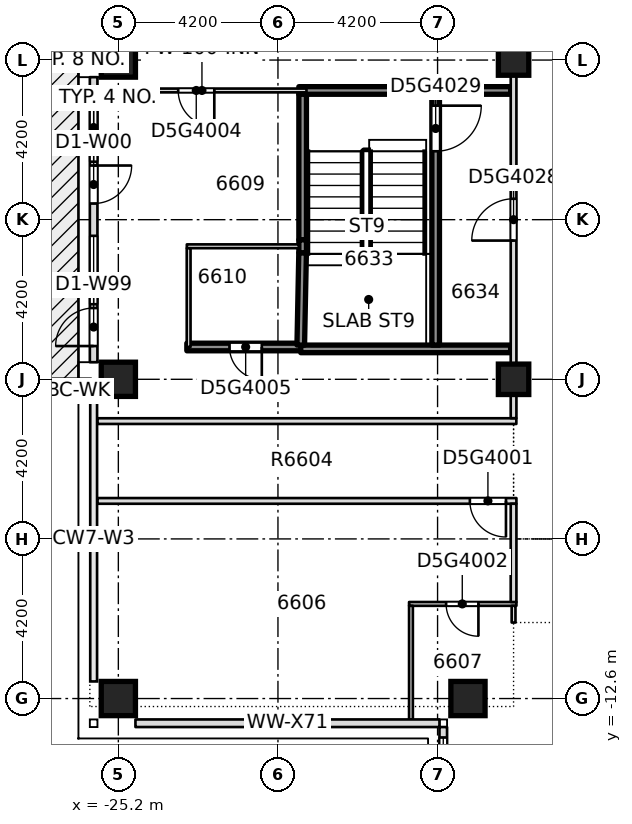
"""IFC4 building model, lengths in metres.
Left out: names, types, materials, properties, quantities, classifications, styles, units other than length and angle.
Written with IfcOpenShell. Run it as: python <this file> out.ifc"""

import sys

from ifc_helpers import new_model, si_unit, direction, frame, frame_2d, origin, origin_2d, place, context, subcontext, project, spatial, rectangle, extrude, element, fill, save


model = new_model("IFC4")
c1 = context("Model", 3, precision=1e-05, world=origin(), true_north=direction((0.0, 1.0)))
c2 = subcontext(c1, "Body", "Model", "MODEL_VIEW")
j1 = project(units=[si_unit("LENGTHUNIT", "METRE"), si_unit("PLANEANGLEUNIT", "RADIAN")], contexts=[c1])
p1 = place(None, origin())
s1 = spatial("IfcSite", under=j1, at=p1, CompositionType="ELEMENT")
p2 = place(p1, origin())
s2 = spatial("IfcBuilding", under=s1, at=p2, CompositionType="ELEMENT")
p3 = place(p2, frame((0.0, 0.0, 251.05)))
s3 = spatial("IfcBuildingStorey", under=s2, at=p3, CompositionType="ELEMENT", Elevation=251.05)
for number, where, z_axis, x_axis in (
    (1, (-25.2, -12.6, -0.4), (0.0, 0.0, 1.0), (1.0, 0.0, 0.0)),
    (2, (-16.0, -12.6, -0.4), (0.0, 0.0, 1.0), (1.0, 0.0, 0.0)),
    (3, (-25.2, -4.2, -0.4), (0.0, 0.0, 1.0), (1.0, 0.0, 0.0)),
    (4, (-25.2, 4.2, -0.4), (0.0, 0.0, 1.0), (1.0, 0.0, 0.0)),
):
    element("IfcColumn", number, at=place(p3, frame(where, z_axis=z_axis, x_axis=x_axis)), inside=s3, PredefinedType="COLUMN", context=c2, shape_type="SweptSolid", body=[
        extrude(rectangle(XDim=0.9, YDim=0.9, at=origin_2d()), origin(), (0.0, 0.0, 1.0), 3.45),
    ])
for number, where, z_axis, x_axis in (
    (5, (-14.8, -4.2, -0.4), (0.0, 0.0, 1.0), (1.0, 0.0, 0.0)),
    (6, (-14.8, 4.2, -0.4), (0.0, 0.0, 1.0), (1.0, 0.0, 0.0)),
):
    element("IfcColumn", number, at=place(p3, frame(where, z_axis=z_axis, x_axis=x_axis)), inside=s3, PredefinedType="COLUMN", context=c2, shape_type="SweptSolid", body=[
        extrude(rectangle(XDim=0.8, YDim=0.8, at=origin_2d()), origin(), (0.0, 0.0, 1.0), 3.45),
    ])
p4 = place(p3, frame((-17.55, -10.11, 0.0), z_axis=(0.0, 0.0, 1.0), x_axis=(1.0, 0.0, 0.0)))
e7 = element("IfcWall", 7, at=p4, inside=s3, PredefinedType="PARTITIONING", context=c2, shape_type="SweptSolid", body=[
    extrude(rectangle(XDim=2.825, YDim=0.1, at=frame_2d((1.413, 0.0))), origin(), (0.0, 0.0, 1.0), 3.05),
])
p5 = place(p4, frame((0.975, 0.0, 0.0)))
e8 = element("IfcOpeningElement", 8, at=p5, cuts=e7, PredefinedType="OPENING", context=c2, shape_type="SweptSolid", body=[
    extrude(rectangle(XDim=0.85, YDim=2.1, at=frame_2d((0.425, 1.05))), frame((0.0, 0.06, 0.0), z_axis=(0.0, -1.0, 0.0), x_axis=(1.0, 0.0, 0.0)), (0.0, 0.0, 1.0), 0.12),
])
p6 = place(p3, frame((-25.75, -7.4, 0.0), z_axis=(0.0, 0.0, 1.0), x_axis=(1.0, 0.0, 0.0)))
e9 = element("IfcWall", 9, at=p6, inside=s3, PredefinedType="PARTITIONING", context=c2, shape_type="SweptSolid", body=[
    extrude(rectangle(XDim=11.025, YDim=0.15, at=frame_2d((5.512, 0.0))), origin(), (0.0, 0.0, 1.0), 3.05),
])
p7 = place(p6, frame((9.8, 0.0, 0.0)))
e10 = element("IfcOpeningElement", 10, at=p7, cuts=e9, PredefinedType="OPENING", context=c2, shape_type="SweptSolid", body=[
    extrude(rectangle(XDim=0.95, YDim=2.1, at=frame_2d((0.475, 1.05))), frame((0.0, 0.085, 0.0), z_axis=(0.0, -1.0, 0.0), x_axis=(1.0, 0.0, 0.0)), (0.0, 0.0, 1.0), 0.17),
])
p8 = place(p3, frame((-25.75, -5.3, 0.0), z_axis=(0.0, 0.0, 1.0), x_axis=(1.0, 0.0, 0.0)))
e11 = element("IfcWall", 11, at=p8, inside=s3, PredefinedType="PARTITIONING", context=c2, shape_type="SweptSolid", body=[
    extrude(rectangle(XDim=11.023, YDim=0.15, at=frame_2d((5.511, 0.0))), origin(), (0.0, 0.0, 1.0), 3.05),
])
p9 = place(p3, frame((-23.398, -3.35, 0.0), z_axis=(0.0, 0.0, 1.0), x_axis=(1.0, 0.0, 0.0)))
e12 = element("IfcWall", 12, at=p9, inside=s3, PredefinedType="SOLIDWALL", context=c2, shape_type="SweptSolid", body=[
    extrude(rectangle(XDim=3.098, YDim=0.2, at=frame_2d((1.549, 0.0))), origin(), (0.0, 0.0, 1.0), 3.05),
])
p10 = place(p9, frame((1.123, 0.0, 0.0)))
e13 = element("IfcOpeningElement", 13, at=p10, cuts=e12, PredefinedType="OPENING", context=c2, shape_type="SweptSolid", body=[
    extrude(rectangle(XDim=0.85, YDim=2.1, at=frame_2d((0.425, 1.05))), frame((0.0, 0.11, 0.0), z_axis=(0.0, -1.0, 0.0), x_axis=(1.0, 0.0, 0.0)), (0.0, 0.0, 1.0), 0.22),
])
p11 = place(p3, frame((-20.4, -3.4, 0.0), z_axis=(0.0, 0.0, 1.0), x_axis=(1.0, 0.0, 0.0)))
e14 = element("IfcWall", 14, at=p11, inside=s3, PredefinedType="SOLIDWALL", context=c2, shape_type="SweptSolid", body=[
    extrude(rectangle(XDim=5.523, YDim=0.2, at=frame_2d((2.761, 0.0))), origin(), (0.0, 0.0, 1.0), 3.05),
])
p12 = place(p3, frame((-23.398, -0.7, 0.0), z_axis=(0.0, 0.0, 1.0), x_axis=(1.0, 0.0, 0.0)))
e15 = element("IfcWall", 15, at=p12, inside=s3, PredefinedType="PARTITIONING", context=c2, shape_type="SweptSolid", body=[
    extrude(rectangle(XDim=2.948, YDim=0.1, at=frame_2d((1.474, 0.0))), origin(), (0.0, 0.0, 1.0), 3.05),
])
p13 = place(p3, frame((-25.75, 3.4, 0.0), z_axis=(0.0, 0.0, 1.0), x_axis=(1.0, 0.0, 0.0)))
e16 = element("IfcWall", 16, at=p13, inside=s3, PredefinedType="PARTITIONING", context=c2, shape_type="SweptSolid", body=[
    extrude(rectangle(XDim=5.5, YDim=0.1, at=frame_2d((2.75, 0.0))), origin(), (0.0, 0.0, 1.0), 3.05),
])
p14 = place(p13, frame((2.125, 0.0, 0.0)))
e17 = element("IfcOpeningElement", 17, at=p14, cuts=e16, PredefinedType="OPENING", context=c2, shape_type="SweptSolid", body=[
    extrude(rectangle(XDim=0.95, YDim=2.1, at=frame_2d((0.475, 1.05))), frame((0.0, 0.06, 0.0), z_axis=(0.0, -1.0, 0.0), x_axis=(1.0, 0.0, 0.0)), (0.0, 0.0, 1.0), 0.12),
])
p15 = place(p3, frame((-20.45, 3.4, 0.0), z_axis=(0.0, 0.0, 1.0), x_axis=(1.0, 0.0, 0.0)))
e18 = element("IfcWall", 18, at=p15, inside=s3, PredefinedType="SOLIDWALL", context=c2, shape_type="SweptSolid", body=[
    extrude(rectangle(XDim=5.575, YDim=0.2, at=frame_2d((2.788, 0.0))), origin(), (0.0, 0.0, 1.0), 3.05),
])
p16 = place(p3, frame((-23.35, -3.348, 0.0), z_axis=(0.0, 0.0, 1.0), x_axis=(0.0, 1.0, 0.0)))
e19 = element("IfcWall", 19, at=p16, inside=s3, PredefinedType="PARTITIONING", context=c2, shape_type="SweptSolid", body=[
    extrude(rectangle(XDim=2.596, YDim=0.1, at=frame_2d((1.298, 0.0))), origin(), (0.0, 0.0, 1.0), 3.05),
])
p17 = place(p3, frame((-20.4, -3.3, 0.0), z_axis=(0.0, 0.0, 1.0), x_axis=(0.019989976481, 0.999800180456, 0.0)))
e20 = element("IfcWall", 20, at=p17, inside=s3, PredefinedType="SOLIDWALL", context=c2, shape_type="SweptSolid", body=[
    extrude(rectangle(XDim=2.43, YDim=0.2, at=frame_2d((1.215, 0.0))), origin(), (0.0, 0.0, 1.0), 3.05),
])
p18 = place(p3, frame((-20.35, -0.53, 0.0), z_axis=(0.0, 0.0, 1.0), x_axis=(0.0, 1.0, 0.0)))
e21 = element("IfcWall", 21, at=p18, inside=s3, PredefinedType="SOLIDWALL", context=c2, shape_type="SweptSolid", body=[
    extrude(rectangle(XDim=3.83, YDim=0.2, at=frame_2d((1.915, 0.0))), origin(), (0.0, 0.0, 1.0), 3.05),
])
p19 = place(p3, frame((-17.5, -13.15, 0.0), z_axis=(0.0, 0.0, 1.0), x_axis=(0.0, 1.0, 0.0)))
e22 = element("IfcWall", 22, at=p19, inside=s3, PredefinedType="PARTITIONING", context=c2, shape_type="SweptSolid", body=[
    extrude(rectangle(XDim=2.99, YDim=0.1, at=frame_2d((1.495, 0.0))), origin(), (0.0, 0.0, 1.0), 3.05),
])
p20 = place(p3, frame((-16.85, -3.3, 0.0), z_axis=(0.0, 0.0, 1.0), x_axis=(0.0, 1.0, 0.0)))
e23 = element("IfcWall", 23, at=p20, inside=s3, PredefinedType="SOLIDWALL", context=c2, shape_type="SweptSolid", body=[
    extrude(rectangle(XDim=6.6, YDim=0.2, at=frame_2d((3.3, 0.0))), origin(), (0.0, 0.0, 1.0), 3.05),
])
p21 = place(p20, frame((5.1, 0.0, 0.0)))
e24 = element("IfcOpeningElement", 24, at=p21, cuts=e23, PredefinedType="OPENING", context=c2, shape_type="SweptSolid", body=[
    extrude(rectangle(XDim=1.2, YDim=2.1, at=frame_2d((0.6, 1.05))), frame((0.0, 0.11, 0.0), z_axis=(0.0, -1.0, 0.0), x_axis=(1.0, 0.0, 0.0)), (0.0, 0.0, 1.0), 0.22),
])
p22 = place(p3, frame((-14.8, -10.6, 0.0), z_axis=(0.0, 0.0, 1.0), x_axis=(0.0, 1.0, 0.0)))
e25 = element("IfcWall", 25, at=p22, inside=s3, PredefinedType="PARTITIONING", context=c2, shape_type="SweptSolid", body=[
    extrude(rectangle(XDim=0.44, YDim=0.1, at=frame_2d((0.22, 0.0))), origin(), (0.0, 0.0, 1.0), 3.05),
])
p23 = place(p3, frame((-14.8, -10.06, 0.0), z_axis=(0.0, 0.0, 1.0), x_axis=(0.0, 1.0, 0.0)))
e26 = element("IfcWall", 26, at=p23, inside=s3, PredefinedType="PARTITIONING", context=c2, shape_type="SweptSolid", body=[
    extrude(rectangle(XDim=2.585, YDim=0.15, at=frame_2d((1.292, 0.0))), origin(), (0.0, 0.0, 1.0), 3.05),
])
p24 = place(p3, frame((-14.8, -5.223, 0.0), z_axis=(0.0, 0.0, 1.0), x_axis=(0.0, 1.0, 0.0)))
e27 = element("IfcWall", 27, at=p24, inside=s3, PredefinedType="PARTITIONING", context=c2, shape_type="SweptSolid", body=[
    extrude(rectangle(XDim=18.523, YDim=0.15, at=frame_2d((9.261, 0.0))), origin(), (0.0, 0.0, 1.0), 3.05),
])
p25 = place(p24, frame((13.098, 0.0, 0.0)))
e28 = element("IfcOpeningElement", 28, at=p25, cuts=e27, PredefinedType="OPENING", context=c2, shape_type="SweptSolid", body=[
    extrude(rectangle(XDim=1.0, YDim=2.1, at=frame_2d((0.5, 1.05))), frame((0.0, 0.085, 0.0), z_axis=(0.0, -1.0, 0.0), x_axis=(1.0, 0.0, 0.0)), (0.0, 0.0, 1.0), 0.17),
])
p26 = place(p24, frame((4.673, 0.0, 0.0)))
e29 = element("IfcOpeningElement", 29, at=p26, cuts=e27, PredefinedType="OPENING", context=c2, shape_type="SweptSolid", body=[
    extrude(rectangle(XDim=1.1, YDim=2.1, at=frame_2d((0.55, 1.05))), frame((0.0, 0.085, 0.0), z_axis=(0.0, -1.0, 0.0), x_axis=(1.0, 0.0, 0.0)), (0.0, 0.0, 1.0), 0.17),
])
p27 = place(p3, frame((-25.85, 3.75, 0.0), z_axis=(0.0, 0.0, 1.0), x_axis=(0.0, -1.0, 0.0)))
e30 = element("IfcWall", 30, at=p27, inside=s3, PredefinedType="STANDARD", context=c2, shape_type="SweptSolid", body=[
    extrude(rectangle(XDim=7.5, YDim=0.2, at=frame_2d((3.75, 0.0))), origin(), (0.0, 0.0, 1.0), 3.05),
])
p28 = place(p27, frame((4.175, 0.0, 0.2)))
e31 = element("IfcOpeningElement", 31, at=p28, cuts=e30, PredefinedType="OPENING", context=c2, shape_type="SweptSolid", body=[
    extrude(rectangle(XDim=1.8, YDim=2.65, at=frame_2d((0.9, 1.325))), frame((0.0, 0.11, 0.0), z_axis=(0.0, -1.0, 0.0), x_axis=(1.0, 0.0, 0.0)), (0.0, 0.0, 1.0), 0.22),
])
p29 = place(p27, frame((6.075, 0.0, 0.0)))
e32 = element("IfcOpeningElement", 32, at=p29, cuts=e30, PredefinedType="OPENING", context=c2, shape_type="SweptSolid", body=[
    extrude(rectangle(XDim=1.0, YDim=2.4, at=frame_2d((0.5, 1.2))), frame((0.0, 0.11, 0.0), z_axis=(0.0, -1.0, 0.0), x_axis=(1.0, 0.0, 0.0)), (0.0, 0.0, 1.0), 0.22),
])
p30 = place(p27, frame((0.425, 0.0, 0.2)))
e33 = element("IfcOpeningElement", 33, at=p30, cuts=e30, PredefinedType="OPENING", context=c2, shape_type="SweptSolid", body=[
    extrude(rectangle(XDim=1.8, YDim=2.65, at=frame_2d((0.9, 1.325))), frame((0.0, 0.11, 0.0), z_axis=(0.0, -1.0, 0.0), x_axis=(1.0, 0.0, 0.0)), (0.0, 0.0, 1.0), 0.22),
])
p31 = place(p27, frame((2.325, 0.0, 0.0)))
e34 = element("IfcOpeningElement", 34, at=p31, cuts=e30, PredefinedType="OPENING", context=c2, shape_type="SweptSolid", body=[
    extrude(rectangle(XDim=1.0, YDim=2.4, at=frame_2d((0.5, 1.2))), frame((0.0, 0.11, 0.0), z_axis=(0.0, -1.0, 0.0), x_axis=(1.0, 0.0, 0.0)), (0.0, 0.0, 1.0), 0.22),
])
p32 = place(p3, frame((-24.75, -13.25, 0.0), z_axis=(0.0, 0.0, 1.0), x_axis=(1.0, 0.0, 0.0)))
e35 = element("IfcWall", 35, at=p32, inside=s3, PredefinedType="STANDARD", context=c2, shape_type="SweptSolid", body=[
    extrude(rectangle(XDim=8.0, YDim=0.2, at=frame_2d((4.0, 0.0))), origin(), (0.0, 0.0, 1.0), 3.05),
])
p33 = place(p3, frame((-16.65, -13.35, 0.0), z_axis=(0.0, 0.0, 1.0), x_axis=(0.0, -1.0, 0.0)))
e36 = element("IfcWall", 36, at=p33, inside=s3, PredefinedType="STANDARD", context=c2, shape_type="SweptSolid", body=[
    extrude(rectangle(XDim=7.2, YDim=0.2, at=frame_2d((3.6, 0.0))), origin(), (0.0, 0.0, 1.0), 3.05),
])
p34 = place(p33, frame((3.875, 0.0, 0.2)))
e37 = element("IfcOpeningElement", 37, at=p34, cuts=e36, PredefinedType="OPENING", context=c2, shape_type="SweptSolid", body=[
    extrude(rectangle(XDim=1.8, YDim=2.65, at=frame_2d((0.9, 1.325))), frame((0.0, 0.11, 0.0), z_axis=(0.0, -1.0, 0.0), x_axis=(1.0, 0.0, 0.0)), (0.0, 0.0, 1.0), 0.22),
])
p35 = place(p33, frame((0.275, 0.0, 0.2)))
e38 = element("IfcOpeningElement", 38, at=p35, cuts=e36, PredefinedType="OPENING", context=c2, shape_type="SweptSolid", body=[
    extrude(rectangle(XDim=1.8, YDim=2.65, at=frame_2d((0.9, 1.325))), frame((0.0, 0.11, 0.0), z_axis=(0.0, -1.0, 0.0), x_axis=(1.0, 0.0, 0.0)), (0.0, 0.0, 1.0), 0.22),
])
p36 = place(p3, frame((-20.35, -0.87, 0.0), z_axis=(0.0, 0.0, 1.0), x_axis=(0.0, 1.0, 0.0)))
e39 = element("IfcWall", 39, at=p36, inside=s3, PredefinedType="SOLIDWALL", context=c2, shape_type="SweptSolid", body=[
    extrude(rectangle(XDim=0.34, YDim=0.2, at=frame_2d((0.17, 0.0))), origin(), (0.0, 0.0, 1.0), 3.05),
])
p37 = place(p7, origin())
e40 = element("IfcDoor", 40, at=p37, inside=s3, OperationType="SINGLE_SWING_RIGHT", PredefinedType="DOOR", context=c2, shape_type="SweptSolid", body=[
    extrude(rectangle(XDim=0.95, YDim=2.1, at=frame_2d((0.475, 1.05))), frame((0.0, 0.025, 0.0), z_axis=(0.0, -1.0, 0.0), x_axis=(1.0, 0.0, 0.0)), (0.0, 0.0, 1.0), 0.05),
])
fill(e10, e40)
p38 = place(p5, origin())
e41 = element("IfcDoor", 41, at=p38, inside=s3, OperationType="SINGLE_SWING_RIGHT", PredefinedType="DOOR", context=c2, shape_type="SweptSolid", body=[
    extrude(rectangle(XDim=0.85, YDim=2.1, at=frame_2d((0.425, 1.05))), frame((0.0, 0.025, 0.0), z_axis=(0.0, -1.0, 0.0), x_axis=(1.0, 0.0, 0.0)), (0.0, 0.0, 1.0), 0.05),
])
fill(e8, e41)
p39 = place(p14, origin())
e42 = element("IfcDoor", 42, at=p39, inside=s3, OperationType="SINGLE_SWING_LEFT", PredefinedType="DOOR", context=c2, shape_type="SweptSolid", body=[
    extrude(rectangle(XDim=0.95, YDim=2.1, at=frame_2d((0.475, 1.05))), frame((0.0, 0.025, 0.0), z_axis=(0.0, -1.0, 0.0), x_axis=(1.0, 0.0, 0.0)), (0.0, 0.0, 1.0), 0.05),
])
fill(e17, e42)
p40 = place(p10, origin())
e43 = element("IfcDoor", 43, at=p40, inside=s3, OperationType="SINGLE_SWING_LEFT", PredefinedType="DOOR", context=c2, shape_type="SweptSolid", body=[
    extrude(rectangle(XDim=0.85, YDim=2.1, at=frame_2d((0.425, 1.05))), frame((0.0, 0.025, 0.0), z_axis=(0.0, -1.0, 0.0), x_axis=(1.0, 0.0, 0.0)), (0.0, 0.0, 1.0), 0.05),
])
fill(e13, e43)
p41 = place(p26, origin())
e44 = element("IfcDoor", 44, at=p41, inside=s3, OperationType="SINGLE_SWING_LEFT", PredefinedType="DOOR", context=c2, shape_type="SweptSolid", body=[
    extrude(rectangle(XDim=1.1, YDim=2.1, at=frame_2d((0.55, 1.05))), frame((0.0, 0.025, 0.0), z_axis=(0.0, -1.0, 0.0), x_axis=(1.0, 0.0, 0.0)), (0.0, 0.0, 1.0), 0.05),
])
fill(e29, e44)
p42 = place(p21, origin())
e45 = element("IfcDoor", 45, at=p42, inside=s3, OperationType="SINGLE_SWING_RIGHT", PredefinedType="DOOR", context=c2, shape_type="SweptSolid", body=[
    extrude(rectangle(XDim=1.2, YDim=2.1, at=frame_2d((0.6, 1.05))), frame((0.0, 0.025, 0.0), z_axis=(0.0, -1.0, 0.0), x_axis=(1.0, 0.0, 0.0)), (0.0, 0.0, 1.0), 0.05),
])
fill(e24, e45)
p43 = place(p28, origin())
e46 = element("IfcWindow", 46, at=p43, inside=s3, PartitioningType="SINGLE_PANEL", PredefinedType="WINDOW", context=c2, shape_type="SweptSolid", body=[
    extrude(rectangle(XDim=1.8, YDim=2.65, at=frame_2d((0.9, 1.325))), frame((0.0, 0.03, 0.0), z_axis=(0.0, -1.0, 0.0), x_axis=(1.0, 0.0, 0.0)), (0.0, 0.0, 1.0), 0.06),
])
fill(e31, e46)
p44 = place(p29, origin())
e47 = element("IfcDoor", 47, at=p44, inside=s3, OperationType="SINGLE_SWING_LEFT", PredefinedType="DOOR", context=c2, shape_type="SweptSolid", body=[
    extrude(rectangle(XDim=1.0, YDim=2.4, at=frame_2d((0.5, 1.2))), frame((0.0, 0.025, 0.0), z_axis=(0.0, -1.0, 0.0), x_axis=(1.0, 0.0, 0.0)), (0.0, 0.0, 1.0), 0.05),
])
fill(e32, e47)
p45 = place(p30, origin())
e48 = element("IfcWindow", 48, at=p45, inside=s3, PartitioningType="SINGLE_PANEL", PredefinedType="WINDOW", context=c2, shape_type="SweptSolid", body=[
    extrude(rectangle(XDim=1.8, YDim=2.65, at=frame_2d((0.9, 1.325))), frame((0.0, 0.03, 0.0), z_axis=(0.0, -1.0, 0.0), x_axis=(1.0, 0.0, 0.0)), (0.0, 0.0, 1.0), 0.06),
])
fill(e33, e48)
p46 = place(p31, origin())
e49 = element("IfcDoor", 49, at=p46, inside=s3, OperationType="SINGLE_SWING_LEFT", PredefinedType="DOOR", context=c2, shape_type="SweptSolid", body=[
    extrude(rectangle(XDim=1.0, YDim=2.4, at=frame_2d((0.5, 1.2))), frame((0.0, 0.025, 0.0), z_axis=(0.0, -1.0, 0.0), x_axis=(1.0, 0.0, 0.0)), (0.0, 0.0, 1.0), 0.05),
])
fill(e34, e49)
p47 = place(p35, origin())
e50 = element("IfcWindow", 50, at=p47, inside=s3, PartitioningType="SINGLE_PANEL", PredefinedType="WINDOW", context=c2, shape_type="SweptSolid", body=[
    extrude(rectangle(XDim=1.8, YDim=2.65, at=frame_2d((0.9, 1.325))), frame((0.0, 0.03, 0.0), z_axis=(0.0, -1.0, 0.0), x_axis=(1.0, 0.0, 0.0)), (0.0, 0.0, 1.0), 0.06),
])
fill(e38, e50)
save(model, sys.argv[1])
